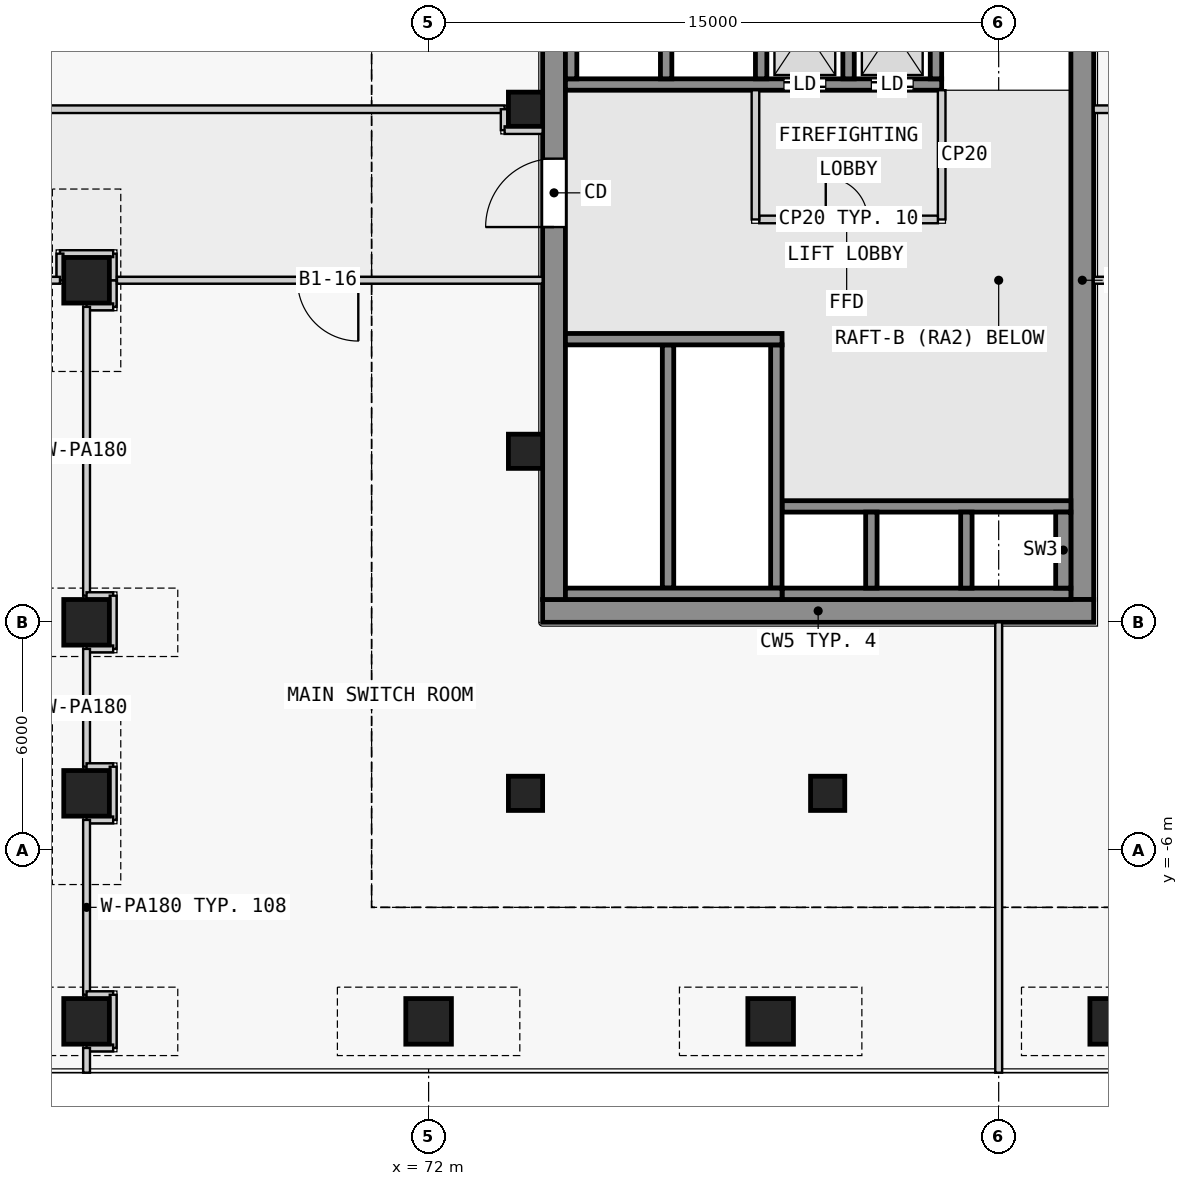
"""IFC4 building model, lengths in metres.
Left out: names, types, materials, properties, quantities, classifications, styles, units other than length and angle.
Written with IfcOpenShell. Run it as: python <this file> out.ifc"""

import sys

from ifc_helpers import new_model, si_unit, direction, frame, frame_2d, origin, origin_2d, place, context, subcontext, project, spatial, rectangle, extrude, element, fill, save


model = new_model("IFC4")
c1 = context("Model", 3, precision=1e-05, world=origin(), true_north=direction((0.0, 1.0)))
c2 = subcontext(c1, "Body", "Model", "MODEL_VIEW")
j1 = project(units=[si_unit("LENGTHUNIT", "METRE"), si_unit("PLANEANGLEUNIT", "RADIAN")], contexts=[c1])
p1 = place(None, origin())
s1 = spatial("IfcSite", under=j1, at=p1, CompositionType="ELEMENT")
p2 = place(p1, origin())
s2 = spatial("IfcBuilding", under=s1, at=p2, CompositionType="ELEMENT")
p3 = place(p2, frame((0.0, 0.0, -7.0)))
s3 = spatial("IfcBuildingStorey", under=s2, at=p3, CompositionType="ELEMENT", Elevation=-7.0)
for number, where, z_axis, x_axis in (
    (1, (63.0, -10.5, 0.0), (0.0, 0.0, 1.0), (1.0, 0.0, 0.0)),
    (2, (63.0, -4.5, 0.0), (0.0, 0.0, 1.0), (1.0, 0.0, 0.0)),
    (3, (63.0, 0.0, 0.0), (0.0, 0.0, 1.0), (1.0, 0.0, 0.0)),
    (4, (63.0, 9.0, 0.0), (0.0, 0.0, 1.0), (1.0, 0.0, 0.0)),
    (5, (72.0, -10.5, 0.0), (0.0, 0.0, 1.0), (1.0, 0.0, 0.0)),
    (6, (81.0, -10.5, 0.0), (0.0, 0.0, 1.0), (1.0, 0.0, 0.0)),
    (7, (90.0, -10.5, 0.0), (0.0, 0.0, 1.0), (1.0, 0.0, 0.0)),
):
    element("IfcColumn", number, at=place(p3, frame(where, z_axis=z_axis, x_axis=x_axis)), inside=s3, PredefinedType="COLUMN", context=c2, shape_type="SweptSolid", body=[
        extrude(rectangle(XDim=1.2, YDim=1.2, at=origin_2d()), origin(), (0.0, 0.0, 1.0), 7.0),
    ])
for number, where, z_axis, x_axis in (
    (8, (74.55, -4.5, 0.0), (0.0, 0.0, 1.0), (1.0, 0.0, 0.0)),
    (9, (82.5, -4.5, 0.0), (0.0, 0.0, 1.0), (1.0, 0.0, 0.0)),
    (10, (74.55, 13.5, 0.0), (0.0, 0.0, 1.0), (1.0, 0.0, 0.0)),
    (11, (74.55, 4.5, 0.0), (0.0, 0.0, 1.0), (1.0, 0.0, 0.0)),
):
    element("IfcColumn", number, at=place(p3, frame(where, z_axis=z_axis, x_axis=x_axis)), inside=s3, PredefinedType="COLUMN", context=c2, shape_type="SweptSolid", body=[
        extrude(rectangle(XDim=0.9, YDim=0.9, at=origin_2d()), origin(), (0.0, 0.0, 1.0), 7.0),
    ])
p4 = place(p3, frame((75.0, 0.3, 0.0), z_axis=(0.0, 0.0, 1.0), x_axis=(1.0, 0.0, 0.0)))
e12 = element("IfcWall", 12, at=p4, inside=s3, PredefinedType="SHEAR", context=c2, shape_type="SweptSolid", body=[
    extrude(rectangle(XDim=14.5, YDim=0.6, at=frame_2d((7.25, 0.0))), origin(), (0.0, 0.0, 1.0), 6.55),
])
p5 = place(p3, frame((75.3, 0.6, 0.0), z_axis=(0.0, 0.0, 1.0), x_axis=(0.0, 1.0, 0.0)))
e13 = element("IfcWall", 13, at=p5, inside=s3, PredefinedType="SHEAR", context=c2, shape_type="SweptSolid", body=[
    extrude(rectangle(XDim=16.8, YDim=0.6, at=frame_2d((8.4, 0.0))), origin(), (0.0, 0.0, 1.0), 6.55),
])
p6 = place(p5, frame((9.8, 0.0, 0.0)))
e14 = element("IfcOpeningElement", 14, at=p6, cuts=e13, PredefinedType="OPENING", context=c2, shape_type="SweptSolid", body=[
    extrude(rectangle(XDim=1.8, YDim=2.1, at=frame_2d((0.9, 1.05))), frame((0.0, 0.31, 0.0), z_axis=(0.0, -1.0, 0.0), x_axis=(1.0, 0.0, 0.0)), (0.0, 0.0, 1.0), 0.62),
])
p7 = place(p3, frame((89.2, 0.6, 0.0), z_axis=(0.0, 0.0, 1.0), x_axis=(0.0, 1.0, 0.0)))
e15 = element("IfcWall", 15, at=p7, inside=s3, PredefinedType="SHEAR", context=c2, shape_type="SweptSolid", body=[
    extrude(rectangle(XDim=16.8, YDim=0.6, at=frame_2d((8.4, 0.0))), origin(), (0.0, 0.0, 1.0), 6.55),
])
for number, where, z_axis, x_axis in (
    (16, (75.6, 0.75, 0.0), (0.0, 0.0, 1.0), (1.0, 0.0, 0.0)),
    (17, (75.6, 7.45, 0.0), (0.0, 0.0, 1.0), (1.0, 0.0, 0.0)),
):
    element("IfcWall", number, at=place(p3, frame(where, z_axis=z_axis, x_axis=x_axis)), inside=s3, PredefinedType="SHEAR", context=c2, shape_type="SweptSolid", body=[
        extrude(rectangle(XDim=5.7, YDim=0.3, at=frame_2d((2.85, 0.0))), origin(), (0.0, 0.0, 1.0), 6.55),
    ])
for number, where, z_axis, x_axis in (
    (18, (78.3, 0.9, 0.0), (0.0, 0.0, 1.0), (0.0, 1.0, 0.0)),
    (19, (81.15, 0.9, 0.0), (0.0, 0.0, 1.0), (0.0, 1.0, 0.0)),
):
    element("IfcWall", number, at=place(p3, frame(where, z_axis=z_axis, x_axis=x_axis)), inside=s3, PredefinedType="SHEAR", context=c2, shape_type="SweptSolid", body=[
        extrude(rectangle(XDim=6.4, YDim=0.3, at=frame_2d((3.2, 0.0))), origin(), (0.0, 0.0, 1.0), 6.55),
    ])
p8 = place(p3, frame((81.3, 0.75, 0.0), z_axis=(0.0, 0.0, 1.0), x_axis=(1.0, 0.0, 0.0)))
e20 = element("IfcWall", 20, at=p8, inside=s3, PredefinedType="SHEAR", context=c2, shape_type="SweptSolid", body=[
    extrude(rectangle(XDim=7.6, YDim=0.3, at=frame_2d((3.8, 0.0))), origin(), (0.0, 0.0, 1.0), 6.55),
])
for number, where, z_axis, x_axis in (
    (21, (83.65, 0.9, 0.0), (0.0, 0.0, 1.0), (0.0, 1.0, 0.0)),
    (22, (86.15, 0.9, 0.0), (0.0, 0.0, 1.0), (0.0, 1.0, 0.0)),
):
    element("IfcWall", number, at=place(p3, frame(where, z_axis=z_axis, x_axis=x_axis)), inside=s3, PredefinedType="SHEAR", context=c2, shape_type="SweptSolid", body=[
        extrude(rectangle(XDim=2.0, YDim=0.3, at=frame_2d((1.0, 0.0))), origin(), (0.0, 0.0, 1.0), 6.55),
    ])
p9 = place(p3, frame((88.7, 0.9, 0.0), z_axis=(0.0, 0.0, 1.0), x_axis=(0.0, 1.0, 0.0)))
e23 = element("IfcWall", 23, at=p9, inside=s3, PredefinedType="SHEAR", context=c2, shape_type="SweptSolid", body=[
    extrude(rectangle(XDim=2.0, YDim=0.4, at=frame_2d((1.0, 0.0))), origin(), (0.0, 0.0, 1.0), 6.55),
])
p10 = place(p3, frame((81.3, 3.05, 0.0), z_axis=(0.0, 0.0, 1.0), x_axis=(1.0, 0.0, 0.0)))
e24 = element("IfcWall", 24, at=p10, inside=s3, PredefinedType="SHEAR", context=c2, shape_type="SweptSolid", body=[
    extrude(rectangle(XDim=7.6, YDim=0.3, at=frame_2d((3.8, 0.0))), origin(), (0.0, 0.0, 1.0), 6.55),
])
p11 = place(p3, frame((75.6, 14.15, 0.0), z_axis=(0.0, 0.0, 1.0), x_axis=(1.0, 0.0, 0.0)))
e25 = element("IfcWall", 25, at=p11, inside=s3, PredefinedType="SHEAR", context=c2, shape_type="SweptSolid", body=[
    extrude(rectangle(XDim=9.9, YDim=0.3, at=frame_2d((4.95, 0.0))), origin(), (0.0, 0.0, 1.0), 6.55),
])
p12 = place(p11, frame((5.75, 0.0, 0.0)))
e26 = element("IfcOpeningElement", 26, at=p12, cuts=e25, PredefinedType="OPENING", context=c2, shape_type="SweptSolid", body=[
    extrude(rectangle(XDim=1.1, YDim=2.1, at=frame_2d((0.55, 1.05))), frame((0.0, 0.16, 0.0), z_axis=(0.0, -1.0, 0.0), x_axis=(1.0, 0.0, 0.0)), (0.0, 0.0, 1.0), 0.32),
])
p13 = place(p11, frame((8.05, 0.0, 0.0)))
e27 = element("IfcOpeningElement", 27, at=p13, cuts=e25, PredefinedType="OPENING", context=c2, shape_type="SweptSolid", body=[
    extrude(rectangle(XDim=1.1, YDim=2.1, at=frame_2d((0.55, 1.05))), frame((0.0, 0.16, 0.0), z_axis=(0.0, -1.0, 0.0), x_axis=(1.0, 0.0, 0.0)), (0.0, 0.0, 1.0), 0.32),
])
for number, where, z_axis, x_axis in (
    (28, (75.75, 14.3, 0.0), (0.0, 0.0, 1.0), (0.0, 1.0, 0.0)),
    (29, (78.25, 14.3, 0.0), (0.0, 0.0, 1.0), (0.0, 1.0, 0.0)),
    (30, (80.75, 14.3, 0.0), (0.0, 0.0, 1.0), (0.0, 1.0, 0.0)),
    (31, (83.05, 14.3, 0.0), (0.0, 0.0, 1.0), (0.0, 1.0, 0.0)),
    (32, (85.35, 14.3, 0.0), (0.0, 0.0, 1.0), (0.0, 1.0, 0.0)),
):
    element("IfcWall", number, at=place(p3, frame(where, z_axis=z_axis, x_axis=x_axis)), inside=s3, PredefinedType="SHEAR", context=c2, shape_type="SweptSolid", body=[
        extrude(rectangle(XDim=2.8, YDim=0.3, at=frame_2d((1.4, 0.0))), origin(), (0.0, 0.0, 1.0), 6.55),
    ])
p14 = place(p3, frame((80.6, 10.6, 0.0), z_axis=(0.0, 0.0, 1.0), x_axis=(0.0, 1.0, 0.0)))
e33 = element("IfcWall", 33, at=p14, inside=s3, PredefinedType="PARTITIONING", context=c2, shape_type="SweptSolid", body=[
    extrude(rectangle(XDim=3.4, YDim=0.2, at=frame_2d((1.7, 0.0))), origin(), (0.0, 0.0, 1.0), 6.55),
])
p15 = place(p3, frame((80.7, 10.6, 0.0), z_axis=(0.0, 0.0, 1.0), x_axis=(1.0, 0.0, 0.0)))
e34 = element("IfcWall", 34, at=p15, inside=s3, PredefinedType="PARTITIONING", context=c2, shape_type="SweptSolid", body=[
    extrude(rectangle(XDim=4.7, YDim=0.2, at=frame_2d((2.35, 0.0))), origin(), (0.0, 0.0, 1.0), 6.55),
])
p16 = place(p15, frame((1.75, 0.0, 0.0)))
e35 = element("IfcOpeningElement", 35, at=p16, cuts=e34, PredefinedType="OPENING", context=c2, shape_type="SweptSolid", body=[
    extrude(rectangle(XDim=1.1, YDim=2.1, at=frame_2d((0.55, 1.05))), frame((0.0, 0.11, 0.0), z_axis=(0.0, -1.0, 0.0), x_axis=(1.0, 0.0, 0.0)), (0.0, 0.0, 1.0), 0.22),
])
p17 = place(p3, frame((85.5, 10.6, 0.0), z_axis=(0.0, 0.0, 1.0), x_axis=(0.0, 1.0, 0.0)))
e36 = element("IfcWall", 36, at=p17, inside=s3, PredefinedType="PARTITIONING", context=c2, shape_type="SweptSolid", body=[
    extrude(rectangle(XDim=3.4, YDim=0.2, at=frame_2d((1.7, 0.0))), origin(), (0.0, 0.0, 1.0), 6.55),
])
p18 = place(p3, frame((27.0, 13.5, 0.0), z_axis=(0.0, 0.0, 1.0), x_axis=(1.0, 0.0, 0.0)))
e37 = element("IfcWall", 37, at=p18, inside=s3, PredefinedType="PARTITIONING", context=c2, shape_type="SweptSolid", body=[
    extrude(rectangle(XDim=47.0, YDim=0.2, at=frame_2d((23.5, 0.0))), origin(), (0.0, 0.0, 1.0), 6.55),
])
p19 = place(p3, frame((74.0, 13.5, 0.0), z_axis=(0.0, 0.0, 1.0), x_axis=(0.0, -1.0, 0.0)))
e38 = element("IfcWall", 38, at=p19, inside=s3, PredefinedType="PARTITIONING", context=c2, shape_type="SweptSolid", body=[
    extrude(rectangle(XDim=0.55, YDim=0.2, at=frame_2d((0.275, 0.0))), origin(), (0.0, 0.0, 1.0), 6.55),
])
p20 = place(p3, frame((74.0, 12.95, 0.0), z_axis=(0.0, 0.0, 1.0), x_axis=(1.0, 0.0, 0.0)))
e39 = element("IfcWall", 39, at=p20, inside=s3, PredefinedType="PARTITIONING", context=c2, shape_type="SweptSolid", body=[
    extrude(rectangle(XDim=1.0, YDim=0.2, at=frame_2d((0.5, 0.0))), origin(), (0.0, 0.0, 1.0), 6.55),
])
for number, where, z_axis, x_axis in (
    (40, (63.7, 9.0, 0.0), (0.0, 0.0, 1.0), (0.0, -1.0, 0.0)),
    (41, (63.7, 8.3, 0.0), (0.0, 0.0, 1.0), (-1.0, 0.0, 0.0)),
):
    element("IfcWall", number, at=place(p3, frame(where, z_axis=z_axis, x_axis=x_axis)), inside=s3, PredefinedType="PARTITIONING", context=c2, shape_type="SweptSolid", body=[
        extrude(rectangle(XDim=0.7, YDim=0.18, at=frame_2d((0.35, 0.0))), origin(), (0.0, 0.0, 1.0), 6.55),
    ])
p21 = place(p3, frame((63.0, 8.3, 0.0), z_axis=(0.0, 0.0, 1.0), x_axis=(0.0, -1.0, 0.0)))
e42 = element("IfcWall", 42, at=p21, inside=s3, PredefinedType="PARTITIONING", context=c2, shape_type="SweptSolid", body=[
    extrude(rectangle(XDim=7.6, YDim=0.18, at=frame_2d((3.8, 0.0))), origin(), (0.0, 0.0, 1.0), 6.55),
])
p22 = place(p3, frame((63.0, 0.7, 0.0), z_axis=(0.0, 0.0, 1.0), x_axis=(1.0, 0.0, 0.0)))
e43 = element("IfcWall", 43, at=p22, inside=s3, PredefinedType="PARTITIONING", context=c2, shape_type="SweptSolid", body=[
    extrude(rectangle(XDim=0.7, YDim=0.18, at=frame_2d((0.35, 0.0))), origin(), (0.0, 0.0, 1.0), 6.55),
])
p23 = place(p3, frame((63.7, 0.7, 0.0), z_axis=(0.0, 0.0, 1.0), x_axis=(0.0, -1.0, 0.0)))
e44 = element("IfcWall", 44, at=p23, inside=s3, PredefinedType="PARTITIONING", context=c2, shape_type="SweptSolid", body=[
    extrude(rectangle(XDim=1.4, YDim=0.18, at=frame_2d((0.7, 0.0))), origin(), (0.0, 0.0, 1.0), 6.55),
])
p24 = place(p3, frame((63.7, -0.7, 0.0), z_axis=(0.0, 0.0, 1.0), x_axis=(-1.0, 0.0, 0.0)))
e45 = element("IfcWall", 45, at=p24, inside=s3, PredefinedType="PARTITIONING", context=c2, shape_type="SweptSolid", body=[
    extrude(rectangle(XDim=0.7, YDim=0.18, at=frame_2d((0.35, 0.0))), origin(), (0.0, 0.0, 1.0), 6.55),
])
p25 = place(p3, frame((63.0, -0.7, 0.0), z_axis=(0.0, 0.0, 1.0), x_axis=(0.0, -1.0, 0.0)))
e46 = element("IfcWall", 46, at=p25, inside=s3, PredefinedType="PARTITIONING", context=c2, shape_type="SweptSolid", body=[
    extrude(rectangle(XDim=3.1, YDim=0.18, at=frame_2d((1.55, 0.0))), origin(), (0.0, 0.0, 1.0), 6.55),
])
p26 = place(p3, frame((63.0, -3.8, 0.0), z_axis=(0.0, 0.0, 1.0), x_axis=(1.0, 0.0, 0.0)))
e47 = element("IfcWall", 47, at=p26, inside=s3, PredefinedType="PARTITIONING", context=c2, shape_type="SweptSolid", body=[
    extrude(rectangle(XDim=0.7, YDim=0.18, at=frame_2d((0.35, 0.0))), origin(), (0.0, 0.0, 1.0), 6.55),
])
p27 = place(p3, frame((63.7, -3.8, 0.0), z_axis=(0.0, 0.0, 1.0), x_axis=(0.0, -1.0, 0.0)))
e48 = element("IfcWall", 48, at=p27, inside=s3, PredefinedType="PARTITIONING", context=c2, shape_type="SweptSolid", body=[
    extrude(rectangle(XDim=1.4, YDim=0.18, at=frame_2d((0.7, 0.0))), origin(), (0.0, 0.0, 1.0), 6.55),
])
p28 = place(p3, frame((63.7, -5.2, 0.0), z_axis=(0.0, 0.0, 1.0), x_axis=(-1.0, 0.0, 0.0)))
e49 = element("IfcWall", 49, at=p28, inside=s3, PredefinedType="PARTITIONING", context=c2, shape_type="SweptSolid", body=[
    extrude(rectangle(XDim=0.7, YDim=0.18, at=frame_2d((0.35, 0.0))), origin(), (0.0, 0.0, 1.0), 6.55),
])
p29 = place(p3, frame((63.0, -5.2, 0.0), z_axis=(0.0, 0.0, 1.0), x_axis=(0.0, -1.0, 0.0)))
e50 = element("IfcWall", 50, at=p29, inside=s3, PredefinedType="PARTITIONING", context=c2, shape_type="SweptSolid", body=[
    extrude(rectangle(XDim=4.6, YDim=0.18, at=frame_2d((2.3, 0.0))), origin(), (0.0, 0.0, 1.0), 6.55),
])
p30 = place(p3, frame((63.0, -9.8, 0.0), z_axis=(0.0, 0.0, 1.0), x_axis=(1.0, 0.0, 0.0)))
e51 = element("IfcWall", 51, at=p30, inside=s3, PredefinedType="PARTITIONING", context=c2, shape_type="SweptSolid", body=[
    extrude(rectangle(XDim=0.7, YDim=0.18, at=frame_2d((0.35, 0.0))), origin(), (0.0, 0.0, 1.0), 6.55),
])
p31 = place(p3, frame((63.7, -9.8, 0.0), z_axis=(0.0, 0.0, 1.0), x_axis=(0.0, -1.0, 0.0)))
e52 = element("IfcWall", 52, at=p31, inside=s3, PredefinedType="PARTITIONING", context=c2, shape_type="SweptSolid", body=[
    extrude(rectangle(XDim=1.4, YDim=0.18, at=frame_2d((0.7, 0.0))), origin(), (0.0, 0.0, 1.0), 6.55),
])
p32 = place(p3, frame((63.7, -11.2, 0.0), z_axis=(0.0, 0.0, 1.0), x_axis=(-1.0, 0.0, 0.0)))
e53 = element("IfcWall", 53, at=p32, inside=s3, PredefinedType="PARTITIONING", context=c2, shape_type="SweptSolid", body=[
    extrude(rectangle(XDim=0.7, YDim=0.18, at=frame_2d((0.35, 0.0))), origin(), (0.0, 0.0, 1.0), 6.55),
])
p33 = place(p3, frame((63.0, -11.2, 0.0), z_axis=(0.0, 0.0, 1.0), x_axis=(0.0, -1.0, 0.0)))
e54 = element("IfcWall", 54, at=p33, inside=s3, PredefinedType="PARTITIONING", context=c2, shape_type="SweptSolid", body=[
    extrude(rectangle(XDim=0.65, YDim=0.18, at=frame_2d((0.325, 0.0))), origin(), (0.0, 0.0, 1.0), 6.55),
])
p34 = place(p3, frame((63.7, 9.0, 0.0), z_axis=(0.0, 0.0, 1.0), x_axis=(0.0, 1.0, 0.0)))
e55 = element("IfcWall", 55, at=p34, inside=s3, PredefinedType="PARTITIONING", context=c2, shape_type="SweptSolid", body=[
    extrude(rectangle(XDim=0.7, YDim=0.18, at=frame_2d((0.35, 0.0))), origin(), (0.0, 0.0, 1.0), 6.55),
])
p35 = place(p3, frame((63.7, 9.7, 0.0), z_axis=(0.0, 0.0, 1.0), x_axis=(-1.0, 0.0, 0.0)))
e56 = element("IfcWall", 56, at=p35, inside=s3, PredefinedType="PARTITIONING", context=c2, shape_type="SweptSolid", body=[
    extrude(rectangle(XDim=1.4, YDim=0.18, at=frame_2d((0.7, 0.0))), origin(), (0.0, 0.0, 1.0), 6.55),
])
p36 = place(p3, frame((62.3, 9.7, 0.0), z_axis=(0.0, 0.0, 1.0), x_axis=(0.0, -1.0, 0.0)))
e57 = element("IfcWall", 57, at=p36, inside=s3, PredefinedType="PARTITIONING", context=c2, shape_type="SweptSolid", body=[
    extrude(rectangle(XDim=0.7, YDim=0.18, at=frame_2d((0.35, 0.0))), origin(), (0.0, 0.0, 1.0), 6.55),
])
p37 = place(p3, frame((62.3, 9.0, 0.0), z_axis=(0.0, 0.0, 1.0), x_axis=(-1.0, 0.0, 0.0)))
e58 = element("IfcWall", 58, at=p37, inside=s3, PredefinedType="PARTITIONING", context=c2, shape_type="SweptSolid", body=[
    extrude(rectangle(XDim=7.6, YDim=0.18, at=frame_2d((3.8, 0.0))), origin(), (0.0, 0.0, 1.0), 6.55),
])
p38 = place(p3, frame((87.0, 0.0, 0.0), z_axis=(0.0, 0.0, 1.0), x_axis=(0.0, -1.0, 0.0)))
e59 = element("IfcWall", 59, at=p38, inside=s3, PredefinedType="PARTITIONING", context=c2, shape_type="SweptSolid", body=[
    extrude(rectangle(XDim=11.85, YDim=0.18, at=frame_2d((5.925, 0.0))), origin(), (0.0, 0.0, 1.0), 6.55),
])
p39 = place(p3, frame((75.0, 9.0, 0.0), z_axis=(0.0, 0.0, 1.0), x_axis=(-1.0, 0.0, 0.0)))
e60 = element("IfcWall", 60, at=p39, inside=s3, PredefinedType="PARTITIONING", context=c2, shape_type="SweptSolid", body=[
    extrude(rectangle(XDim=11.2, YDim=0.18, at=frame_2d((5.6, 0.0))), origin(), (0.0, 0.0, 1.0), 6.55),
])
p40 = place(p39, frame((4.85, 0.0, 0.0)))
e61 = element("IfcOpeningElement", 61, at=p40, cuts=e60, PredefinedType="OPENING", context=c2, shape_type="SweptSolid", body=[
    extrude(rectangle(XDim=1.6, YDim=2.4, at=frame_2d((0.8, 1.2))), frame((0.0, 0.1, 0.0), z_axis=(0.0, -1.0, 0.0), x_axis=(1.0, 0.0, 0.0)), (0.0, 0.0, 1.0), 0.2),
])
p41 = place(p3, frame((89.5, 13.5, 0.0), z_axis=(0.0, 0.0, 1.0), x_axis=(1.0, 0.0, 0.0)))
e62 = element("IfcWall", 62, at=p41, inside=s3, PredefinedType="PARTITIONING", context=c2, shape_type="SweptSolid", body=[
    extrude(rectangle(XDim=9.5, YDim=0.2, at=frame_2d((4.75, 0.0))), origin(), (0.0, 0.0, 1.0), 6.55),
])
p42 = place(p3, frame((95.7, 9.0, 0.0), z_axis=(0.0, 0.0, 1.0), x_axis=(-1.0, 0.0, 0.0)))
e63 = element("IfcWall", 63, at=p42, inside=s3, PredefinedType="PARTITIONING", context=c2, shape_type="SweptSolid", body=[
    extrude(rectangle(XDim=6.2, YDim=0.18, at=frame_2d((3.1, 0.0))), origin(), (0.0, 0.0, 1.0), 6.55),
])
p43 = place(p42, frame((2.35, 0.0, 0.0)))
e64 = element("IfcOpeningElement", 64, at=p43, cuts=e63, PredefinedType="OPENING", context=c2, shape_type="SweptSolid", body=[
    extrude(rectangle(XDim=1.6, YDim=2.4, at=frame_2d((0.8, 1.2))), frame((0.0, 0.1, 0.0), z_axis=(0.0, -1.0, 0.0), x_axis=(1.0, 0.0, 0.0)), (0.0, 0.0, 1.0), 0.2),
])
p44 = place(p16, origin())
e65 = element("IfcDoor", 65, at=p44, inside=s3, OperationType="SINGLE_SWING_LEFT", PredefinedType="DOOR", context=c2, shape_type="SweptSolid", body=[
    extrude(rectangle(XDim=1.1, YDim=2.1, at=frame_2d((0.55, 1.05))), frame((0.0, 0.025, 0.0), z_axis=(0.0, -1.0, 0.0), x_axis=(1.0, 0.0, 0.0)), (0.0, 0.0, 1.0), 0.05),
])
fill(e35, e65)
p45 = place(p12, origin())
e66 = element("IfcDoor", 66, at=p45, inside=s3, OperationType="DOUBLE_DOOR_SLIDING", PredefinedType="DOOR", context=c2, shape_type="SweptSolid", body=[
    extrude(rectangle(XDim=1.1, YDim=2.1, at=frame_2d((0.55, 1.05))), frame((0.0, 0.025, 0.0), z_axis=(0.0, -1.0, 0.0), x_axis=(1.0, 0.0, 0.0)), (0.0, 0.0, 1.0), 0.05),
])
fill(e26, e66)
p46 = place(p13, origin())
e67 = element("IfcDoor", 67, at=p46, inside=s3, OperationType="DOUBLE_DOOR_SLIDING", PredefinedType="DOOR", context=c2, shape_type="SweptSolid", body=[
    extrude(rectangle(XDim=1.1, YDim=2.1, at=frame_2d((0.55, 1.05))), frame((0.0, 0.025, 0.0), z_axis=(0.0, -1.0, 0.0), x_axis=(1.0, 0.0, 0.0)), (0.0, 0.0, 1.0), 0.05),
])
fill(e27, e67)
p47 = place(p6, origin())
e68 = element("IfcDoor", 68, at=p47, inside=s3, OperationType="DOUBLE_DOOR_SINGLE_SWING", PredefinedType="DOOR", context=c2, shape_type="SweptSolid", body=[
    extrude(rectangle(XDim=1.8, YDim=2.1, at=frame_2d((0.9, 1.05))), frame((0.0, 0.025, 0.0), z_axis=(0.0, -1.0, 0.0), x_axis=(1.0, 0.0, 0.0)), (0.0, 0.0, 1.0), 0.05),
])
fill(e14, e68)
p48 = place(p40, origin())
e69 = element("IfcDoor", 69, at=p48, inside=s3, OperationType="SINGLE_SWING_LEFT", PredefinedType="DOOR", context=c2, shape_type="SweptSolid", body=[
    extrude(rectangle(XDim=1.6, YDim=2.4, at=frame_2d((0.8, 1.2))), frame((0.0, 0.025, 0.0), z_axis=(0.0, -1.0, 0.0), x_axis=(1.0, 0.0, 0.0)), (0.0, 0.0, 1.0), 0.05),
])
fill(e61, e69)
save(model, sys.argv[1])
